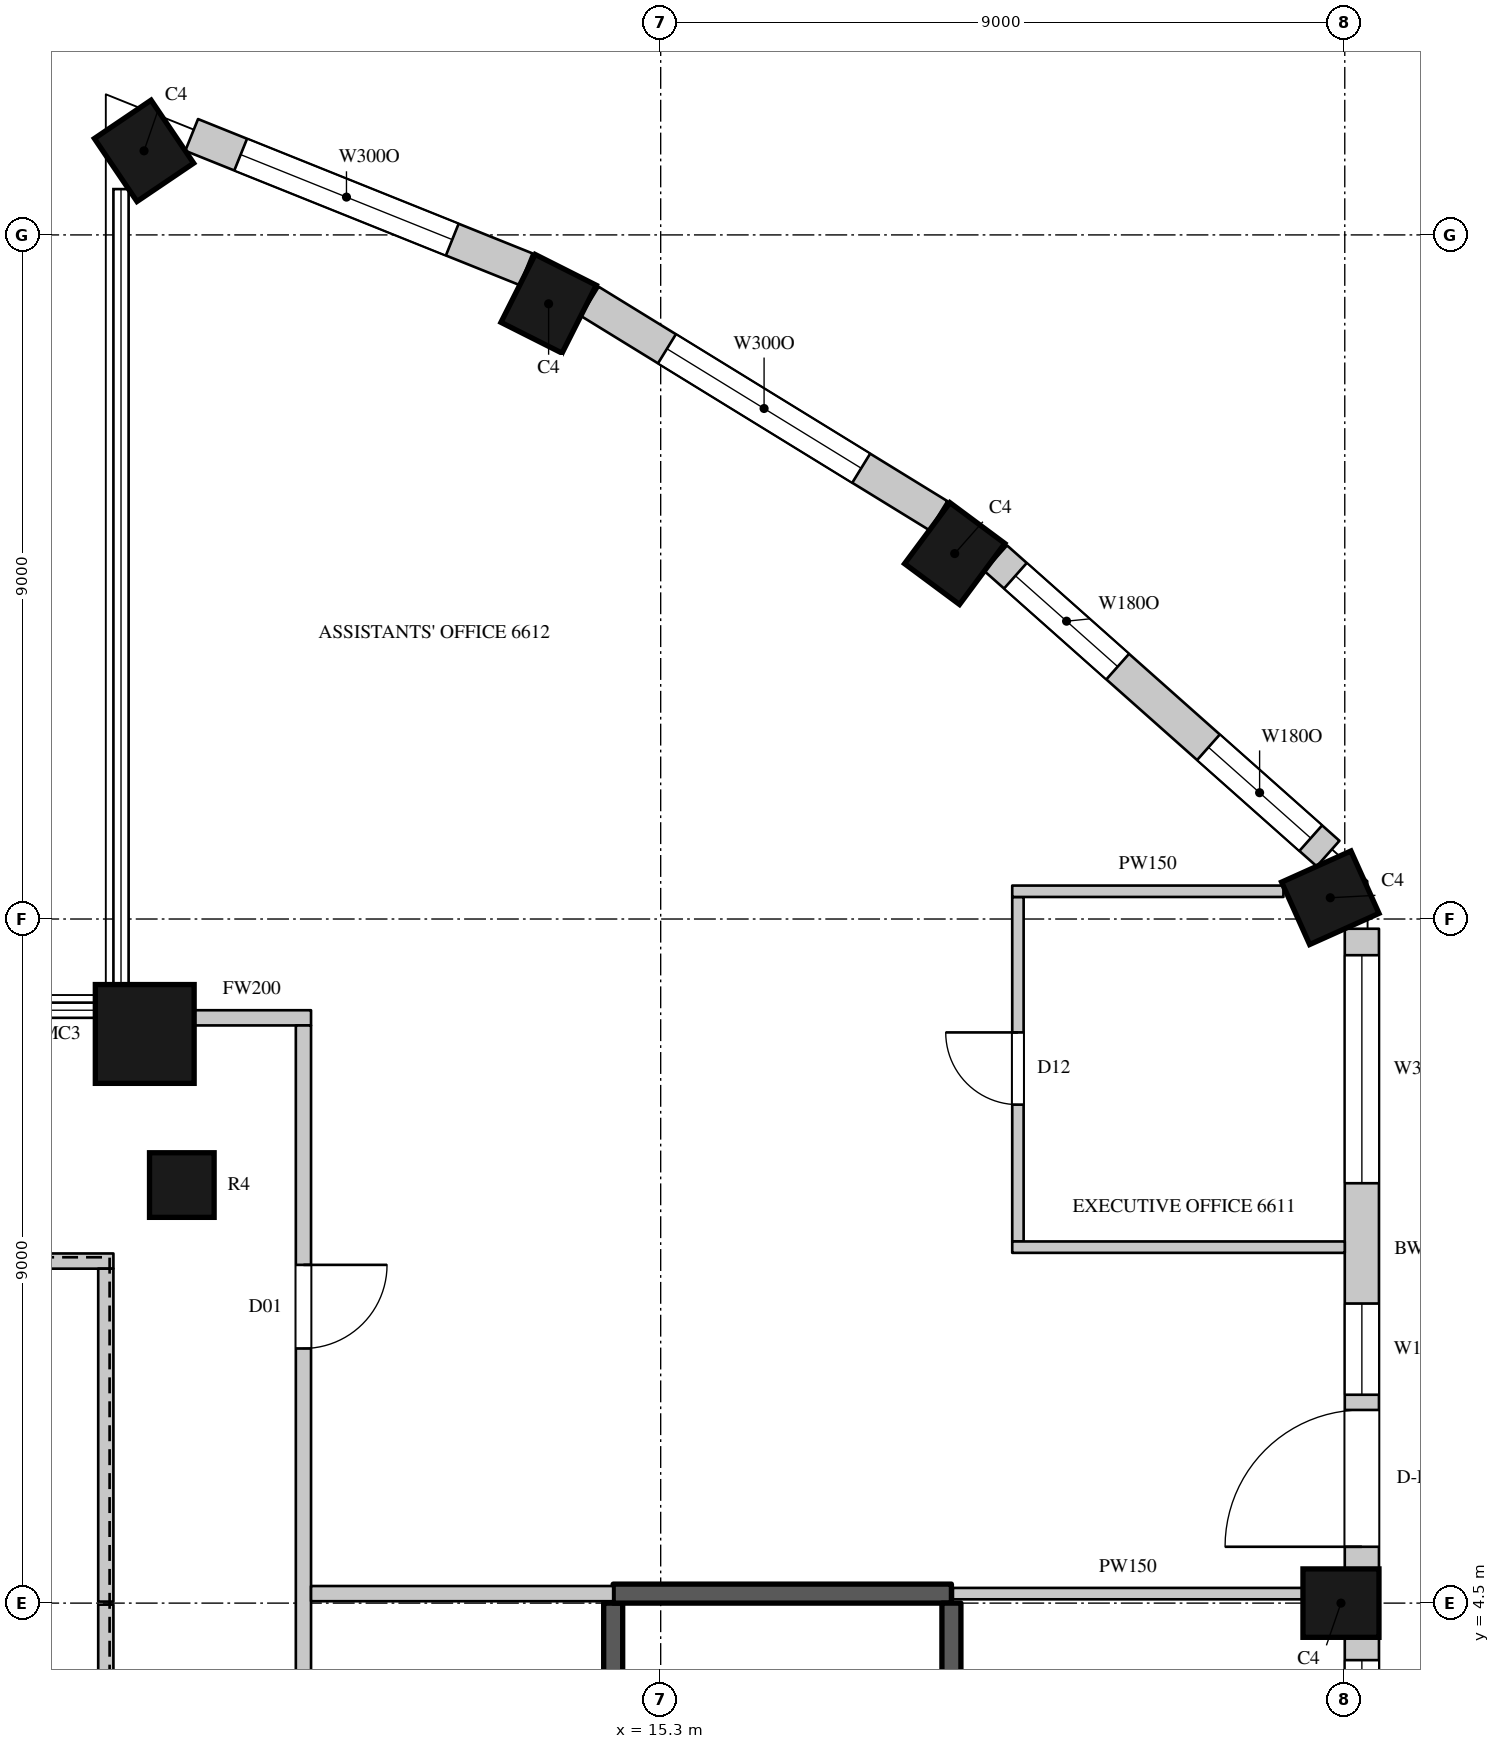
"""IFC4 building model, lengths in metres.
Left out: names, types, materials, properties, quantities, classifications, styles, units other than length and angle.
Written with IfcOpenShell. Run it as: python <this file> out.ifc"""

import sys

from ifc_helpers import new_model, si_unit, direction, frame, frame_2d, origin, origin_2d, place, context, subcontext, project, spatial, rectangle, circle, extrude, element, fill, save


model = new_model("IFC4")
c1 = context("Model", 3, precision=1e-05, world=origin(), true_north=direction((0.0, 1.0)))
c2 = subcontext(c1, "Body", "Model", "MODEL_VIEW")
j1 = project(units=[si_unit("LENGTHUNIT", "METRE"), si_unit("PLANEANGLEUNIT", "RADIAN")], contexts=[c1])
p1 = place(None, origin())
s1 = spatial("IfcSite", under=j1, at=p1, CompositionType="ELEMENT")
p2 = place(p1, origin())
s2 = spatial("IfcBuilding", under=s1, at=p2, CompositionType="ELEMENT")
p3 = place(p2, frame((0.0, 0.0, 292.6)))
s3 = spatial("IfcBuildingStorey", under=s2, at=p3, CompositionType="ELEMENT", Elevation=292.6)
p4 = place(p3, frame((8.503, 23.606, 0.0), z_axis=(0.0, 0.0, 1.0), x_axis=(-0.828469606019, -0.560034027451, 0.0)))
e1 = element("IfcColumn", 1, at=p4, inside=s3, PredefinedType="COLUMN", context=c2, shape_type="SweptSolid", body=[
    extrude(rectangle(XDim=0.9, YDim=1.0, at=origin_2d()), origin(), (0.0, 0.0, 1.0), 4.1),
])
p5 = place(p3, frame((8.512, 11.988, 0.0), z_axis=(0.0, 0.0, 1.0), x_axis=(1.0, 0.0, 0.0)))
e2 = element("IfcColumn", 2, at=p5, inside=s3, PredefinedType="COLUMN", context=c2, shape_type="SweptSolid", body=[
    extrude(circle(Radius=0.65, at=origin_2d()), origin(), (0.0, 0.0, 1.0), 4.1),
])
for number, where, z_axis, x_axis in (
    (3, (24.25, 4.5, 0.0), (0.0, 0.0, 1.0), (0.0, 1.0, 0.0)),
    (4, (24.11, 13.78, 0.0), (0.0, 0.0, 1.0), (-0.41, 0.912, 0.0)),
    (5, (19.168, 18.308, 0.0), (0.0, 0.0, 1.0), (-0.803, 0.596, 0.0)),
    (6, (13.826, 21.594, 0.0), (0.0, 0.0, 1.0), (-0.893, 0.45, 0.0)),
):
    element("IfcColumn", number, at=place(p3, frame(where, z_axis=z_axis, x_axis=x_axis)), inside=s3, PredefinedType="COLUMN", context=c2, shape_type="SweptSolid", body=[
        extrude(rectangle(XDim=0.9, YDim=1.0, at=origin_2d()), origin(), (0.0, 0.0, 1.0), 4.1),
    ])
p6 = place(p3, frame((9.0, 10.0, 0.0), z_axis=(0.0, 0.0, 1.0), x_axis=(1.0, 0.0, 0.0)))
e7 = element("IfcColumn", 7, at=p6, inside=s3, PredefinedType="COLUMN", context=c2, shape_type="SweptSolid", body=[
    extrude(circle(Radius=0.425, at=origin_2d()), origin(), (0.0, 0.0, 1.0), 4.1),
])
p7 = place(p3, frame((24.525, -4.05, 0.0), z_axis=(0.0, 0.0, 1.0), x_axis=(0.0, 1.0, 0.0)))
e8 = element("IfcWall", 8, at=p7, inside=s3, PredefinedType="SOLIDWALL", context=c2, shape_type="SweptSolid", body=[
    extrude(rectangle(XDim=8.1, YDim=0.45, at=frame_2d((4.05, 0.0))), origin(), (0.0, 0.0, 1.0), 3.8),
])
p8 = place(p7, frame((0.3, 0.0, 1.05)))
e9 = element("IfcOpeningElement", 9, at=p8, cuts=e8, PredefinedType="OPENING", context=c2, shape_type="SweptSolid", body=[
    extrude(rectangle(XDim=3.0, YDim=2.4, at=frame_2d((1.5, 1.2))), frame((0.0, 0.235, 0.0), z_axis=(0.0, -1.0, 0.0), x_axis=(1.0, 0.0, 0.0)), (0.0, 0.0, 1.0), 0.47),
])
p9 = place(p7, frame((4.8, 0.0, 1.05)))
e10 = element("IfcOpeningElement", 10, at=p9, cuts=e8, PredefinedType="OPENING", context=c2, shape_type="SweptSolid", body=[
    extrude(rectangle(XDim=3.0, YDim=2.4, at=frame_2d((1.5, 1.2))), frame((0.0, 0.235, 0.0), z_axis=(0.0, -1.0, 0.0), x_axis=(1.0, 0.0, 0.0)), (0.0, 0.0, 1.0), 0.47),
])
p10 = place(p3, frame((24.525, 4.95, 0.0), z_axis=(0.0, 0.0, 1.0), x_axis=(0.0, 1.0, 0.0)))
e11 = element("IfcWall", 11, at=p10, inside=s3, PredefinedType="SOLIDWALL", context=c2, shape_type="SweptSolid", body=[
    extrude(rectangle(XDim=8.422, YDim=0.45, at=frame_2d((4.211, 0.0))), origin(), (0.0, 0.0, 1.0), 3.8),
])
p11 = place(p10, frame((0.291, 0.0, 0.0)))
e12 = element("IfcOpeningElement", 12, at=p11, cuts=e11, PredefinedType="OPENING", context=c2, shape_type="SweptSolid", body=[
    extrude(rectangle(XDim=1.8, YDim=2.4, at=frame_2d((0.9, 1.2))), frame((0.0, 0.235, 0.0), z_axis=(0.0, -1.0, 0.0), x_axis=(1.0, 0.0, 0.0)), (0.0, 0.0, 1.0), 0.47),
])
p12 = place(p10, frame((2.291, 0.0, 1.05)))
e13 = element("IfcOpeningElement", 13, at=p12, cuts=e11, PredefinedType="OPENING", context=c2, shape_type="SweptSolid", body=[
    extrude(rectangle(XDim=1.2, YDim=2.4, at=frame_2d((0.6, 1.2))), frame((0.0, 0.235, 0.0), z_axis=(0.0, -1.0, 0.0), x_axis=(1.0, 0.0, 0.0)), (0.0, 0.0, 1.0), 0.47),
])
p13 = place(p10, frame((5.074, 0.0, 1.05)))
e14 = element("IfcOpeningElement", 14, at=p13, cuts=e11, PredefinedType="OPENING", context=c2, shape_type="SweptSolid", body=[
    extrude(rectangle(XDim=3.0, YDim=2.4, at=frame_2d((1.5, 1.2))), frame((0.0, 0.235, 0.0), z_axis=(0.0, -1.0, 0.0), x_axis=(1.0, 0.0, 0.0)), (0.0, 0.0, 1.0), 0.47),
])
p14 = place(p3, frame((24.081, 14.361, 0.0), z_axis=(0.0, 0.0, 1.0), x_axis=(-0.747570482973, 0.664182484704, 0.0)))
e15 = element("IfcWall", 15, at=p14, inside=s3, PredefinedType="SOLIDWALL", context=c2, shape_type="SweptSolid", body=[
    extrude(rectangle(XDim=5.85, YDim=0.45, at=frame_2d((2.925, 0.0))), origin(), (0.0, 0.0, 1.0), 3.8),
])
p15 = place(p14, frame((0.305, 0.0, 1.05)))
e16 = element("IfcOpeningElement", 16, at=p15, cuts=e15, PredefinedType="OPENING", context=c2, shape_type="SweptSolid", body=[
    extrude(rectangle(XDim=1.8, YDim=2.4, at=frame_2d((0.9, 1.2))), frame((0.0, 0.235, 0.0), z_axis=(0.0, -1.0, 0.0), x_axis=(1.0, 0.0, 0.0)), (0.0, 0.0, 1.0), 0.47),
])
p16 = place(p14, frame((3.703, 0.0, 1.05)))
e17 = element("IfcOpeningElement", 17, at=p16, cuts=e15, PredefinedType="OPENING", context=c2, shape_type="SweptSolid", body=[
    extrude(rectangle(XDim=1.8, YDim=2.4, at=frame_2d((0.9, 1.2))), frame((0.0, 0.235, 0.0), z_axis=(0.0, -1.0, 0.0), x_axis=(1.0, 0.0, 0.0)), (0.0, 0.0, 1.0), 0.47),
])
p17 = place(p3, frame((18.953, 18.806, 0.0), z_axis=(0.0, 0.0, 1.0), x_axis=(-0.851860664503, 0.523768468193, 0.0)))
e18 = element("IfcWall", 18, at=p17, inside=s3, PredefinedType="SOLIDWALL", context=c2, shape_type="SweptSolid", body=[
    extrude(rectangle(XDim=5.384, YDim=0.45, at=frame_2d((2.692, 0.0))), origin(), (0.0, 0.0, 1.0), 3.8),
])
p18 = place(p17, frame((1.192, 0.0, 1.05)))
e19 = element("IfcOpeningElement", 19, at=p18, cuts=e18, PredefinedType="OPENING", context=c2, shape_type="SweptSolid", body=[
    extrude(rectangle(XDim=3.0, YDim=2.4, at=frame_2d((1.5, 1.2))), frame((0.0, 0.235, 0.0), z_axis=(0.0, -1.0, 0.0), x_axis=(1.0, 0.0, 0.0)), (0.0, 0.0, 1.0), 0.47),
])
p19 = place(p3, frame((13.529, 22.048, 0.0), z_axis=(0.0, 0.0, 1.0), x_axis=(-0.927957332619, 0.372686448424, 0.0)))
e20 = element("IfcWall", 20, at=p19, inside=s3, PredefinedType="SOLIDWALL", context=c2, shape_type="SweptSolid", body=[
    extrude(rectangle(XDim=4.741, YDim=0.45, at=frame_2d((2.371, 0.0))), origin(), (0.0, 0.0, 1.0), 3.8),
])
p20 = place(p19, frame((1.047, 0.0, 1.05)))
e21 = element("IfcOpeningElement", 21, at=p20, cuts=e20, PredefinedType="OPENING", context=c2, shape_type="SweptSolid", body=[
    extrude(rectangle(XDim=3.0, YDim=2.4, at=frame_2d((1.5, 1.2))), frame((0.0, 0.235, 0.0), z_axis=(0.0, -1.0, 0.0), x_axis=(1.0, 0.0, 0.0)), (0.0, 0.0, 1.0), 0.47),
])
p21 = place(p3, frame((-6.1, 9.0, 0.0), z_axis=(0.0, 0.0, 1.0), x_axis=(1.0, 0.0, 0.0)))
e22 = element("IfcWall", 22, at=p21, inside=s3, PredefinedType="PARTITIONING", context=c2, shape_type="SweptSolid", body=[
    extrude(rectangle(XDim=14.2, YDim=0.2, at=frame_2d((7.1, 0.0))), origin(), (0.0, 0.0, 1.0), 3.8),
])
p22 = place(p3, frame((8.0, -8.9, 0.0), z_axis=(0.0, 0.0, 1.0), x_axis=(0.0, 1.0, 0.0)))
e23 = element("IfcWall", 23, at=p22, inside=s3, PredefinedType="PARTITIONING", context=c2, shape_type="SweptSolid", body=[
    extrude(rectangle(XDim=13.38, YDim=0.2, at=frame_2d((6.69, 0.0))), origin(), (0.0, 0.0, 1.0), 3.8),
])
p23 = place(p3, frame((8.0, 4.52, 0.0), z_axis=(0.0, 0.0, 1.0), x_axis=(0.0, 1.0, 0.0)))
e24 = element("IfcWall", 24, at=p23, inside=s3, PredefinedType="PARTITIONING", context=c2, shape_type="SweptSolid", body=[
    extrude(rectangle(XDim=4.38, YDim=0.2, at=frame_2d((2.19, 0.0))), origin(), (0.0, 0.0, 1.0), 3.8),
])
p24 = place(p3, frame((9.144, 12.2, 0.0), z_axis=(0.0, 0.0, 1.0), x_axis=(1.0, 0.0, 0.0)))
e25 = element("IfcWall", 25, at=p24, inside=s3, PredefinedType="PARTITIONING", context=c2, shape_type="SweptSolid", body=[
    extrude(rectangle(XDim=1.556, YDim=0.2, at=frame_2d((0.778, 0.0))), origin(), (0.0, 0.0, 1.0), 3.8),
])
p25 = place(p3, frame((10.6, -11.6, 0.0), z_axis=(0.0, 0.0, 1.0), x_axis=(0.0, 1.0, 0.0)))
e26 = element("IfcWall", 26, at=p25, inside=s3, PredefinedType="PARTITIONING", context=c2, shape_type="SweptSolid", body=[
    extrude(rectangle(XDim=23.7, YDim=0.2, at=frame_2d((11.85, 0.0))), origin(), (0.0, 0.0, 1.0), 3.8),
])
p26 = place(p25, frame((9.45, 0.0, 0.0)))
e27 = element("IfcOpeningElement", 27, at=p26, cuts=e26, PredefinedType="OPENING", context=c2, shape_type="SweptSolid", body=[
    extrude(rectangle(XDim=1.5, YDim=2.4, at=frame_2d((0.75, 1.2))), frame((0.0, 0.11, 0.0), z_axis=(0.0, -1.0, 0.0), x_axis=(1.0, 0.0, 0.0)), (0.0, 0.0, 1.0), 0.22),
])
p27 = place(p25, frame((19.45, 0.0, 0.0)))
e28 = element("IfcOpeningElement", 28, at=p27, cuts=e26, PredefinedType="OPENING", context=c2, shape_type="SweptSolid", body=[
    extrude(rectangle(XDim=1.1, YDim=2.4, at=frame_2d((0.55, 1.2))), frame((0.0, 0.11, 0.0), z_axis=(0.0, -1.0, 0.0), x_axis=(1.0, 0.0, 0.0)), (0.0, 0.0, 1.0), 0.22),
])
p28 = place(p25, frame((4.6, 0.0, 0.0)))
e29 = element("IfcOpeningElement", 29, at=p28, cuts=e26, PredefinedType="OPENING", context=c2, shape_type="SweptSolid", body=[
    extrude(rectangle(XDim=1.1, YDim=2.4, at=frame_2d((0.55, 1.2))), frame((0.0, 0.11, 0.0), z_axis=(0.0, -1.0, 0.0), x_axis=(1.0, 0.0, 0.0)), (0.0, 0.0, 1.0), 0.22),
])
p29 = place(p3, frame((10.7, 4.625, 0.0), z_axis=(0.0, 0.0, 1.0), x_axis=(1.0, 0.0, 0.0)))
e30 = element("IfcWall", 30, at=p29, inside=s3, PredefinedType="PARTITIONING", context=c2, shape_type="SweptSolid", body=[
    extrude(rectangle(XDim=3.975, YDim=0.2, at=frame_2d((1.988, 0.0))), origin(), (0.0, 0.0, 1.0), 3.8),
])
p30 = place(p3, frame((19.145, 4.625, 0.0), z_axis=(0.0, 0.0, 1.0), x_axis=(1.0, 0.0, 0.0)))
e31 = element("IfcWall", 31, at=p30, inside=s3, PredefinedType="PARTITIONING", context=c2, shape_type="SweptSolid", body=[
    extrude(rectangle(XDim=4.605, YDim=0.15, at=frame_2d((2.302, 0.0))), origin(), (0.0, 0.0, 1.0), 3.8),
])
p31 = place(p3, frame((20.0, 9.258, 0.0), z_axis=(0.0, 0.0, 1.0), x_axis=(0.0, 1.0, 0.0)))
e32 = element("IfcWall", 32, at=p31, inside=s3, PredefinedType="PARTITIONING", context=c2, shape_type="SweptSolid", body=[
    extrude(rectangle(XDim=4.532, YDim=0.15, at=frame_2d((2.266, 0.0))), origin(), (0.0, 0.0, 1.0), 3.8),
])
p32 = place(p31, frame((1.8, 0.0, 0.0)))
e33 = element("IfcOpeningElement", 33, at=p32, cuts=e32, PredefinedType="OPENING", context=c2, shape_type="SweptSolid", body=[
    extrude(rectangle(XDim=0.95, YDim=2.2, at=frame_2d((0.475, 1.1))), frame((0.0, 0.085, 0.0), z_axis=(0.0, -1.0, 0.0), x_axis=(1.0, 0.0, 0.0)), (0.0, 0.0, 1.0), 0.17),
])
p33 = place(p3, frame((19.925, 9.183, 0.0), z_axis=(0.0, 0.0, 1.0), x_axis=(1.0, 0.0, 0.0)))
e34 = element("IfcWall", 34, at=p33, inside=s3, PredefinedType="PARTITIONING", context=c2, shape_type="SweptSolid", body=[
    extrude(rectangle(XDim=4.375, YDim=0.15, at=frame_2d((2.188, 0.0))), origin(), (0.0, 0.0, 1.0), 3.15),
])
p34 = place(p3, frame((19.925, 13.865, 0.0), z_axis=(0.0, 0.0, 1.0), x_axis=(1.0, 0.0, 0.0)))
e35 = element("IfcWall", 35, at=p34, inside=s3, PredefinedType="PARTITIONING", context=c2, shape_type="SweptSolid", body=[
    extrude(rectangle(XDim=3.568, YDim=0.15, at=frame_2d((1.784, 0.0))), origin(), (0.0, 0.0, 1.0), 3.8),
])
p35 = place(p3, frame((14.675, -4.5, 0.0), z_axis=(0.0, 0.0, 1.0), x_axis=(0.0, 1.0, 0.0)))
e36 = element("IfcWall", 36, at=p35, inside=s3, PredefinedType="SHEAR", context=c2, shape_type="SweptSolid", body=[
    extrude(rectangle(XDim=9.0, YDim=0.25, at=frame_2d((4.5, 0.0))), origin(), (0.0, 0.0, 1.0), 3.8),
])
p36 = place(p35, frame((0.45, 0.0, 0.0)))
e37 = element("IfcOpeningElement", 37, at=p36, cuts=e36, PredefinedType="OPENING", context=c2, shape_type="SweptSolid", body=[
    extrude(rectangle(XDim=1.1, YDim=2.2, at=frame_2d((0.55, 1.1))), frame((0.0, 0.135, 0.0), z_axis=(0.0, -1.0, 0.0), x_axis=(1.0, 0.0, 0.0)), (0.0, 0.0, 1.0), 0.27),
])
p37 = place(p3, frame((14.675, 4.625, 0.0), z_axis=(0.0, 0.0, 1.0), x_axis=(1.0, 0.0, 0.0)))
e38 = element("IfcWall", 38, at=p37, inside=s3, PredefinedType="SHEAR", context=c2, shape_type="SweptSolid", body=[
    extrude(rectangle(XDim=4.45, YDim=0.25, at=frame_2d((2.225, 0.0))), origin(), (0.0, 0.0, 1.0), 3.8),
])
p38 = place(p3, frame((19.125, -4.5, 0.0), z_axis=(0.0, 0.0, 1.0), x_axis=(0.0, 1.0, 0.0)))
e39 = element("IfcWall", 39, at=p38, inside=s3, PredefinedType="SHEAR", context=c2, shape_type="SweptSolid", body=[
    extrude(rectangle(XDim=9.0, YDim=0.25, at=frame_2d((4.5, 0.0))), origin(), (0.0, 0.0, 1.0), 3.8),
])
p39 = place(p9, origin())
e40 = element("IfcWindow", 40, at=p39, inside=s3, PartitioningType="SINGLE_PANEL", PredefinedType="WINDOW", context=c2, shape_type="SweptSolid", body=[
    extrude(rectangle(XDim=3.0, YDim=2.4, at=frame_2d((1.5, 1.2))), frame((0.0, 0.135, 0.0), z_axis=(0.0, -1.0, 0.0), x_axis=(1.0, 0.0, 0.0)), (0.0, 0.0, 1.0), 0.06),
])
fill(e10, e40)
p40 = place(p11, origin())
e41 = element("IfcDoor", 41, at=p40, inside=s3, OperationType="SLIDING_TO_LEFT", PredefinedType="DOOR", context=c2, shape_type="SweptSolid", body=[
    extrude(rectangle(XDim=1.8, YDim=2.4, at=frame_2d((0.9, 1.2))), frame((0.0, 0.13, 0.0), z_axis=(0.0, -1.0, 0.0), x_axis=(1.0, 0.0, 0.0)), (0.0, 0.0, 1.0), 0.05),
])
fill(e12, e41)
p41 = place(p12, origin())
e42 = element("IfcWindow", 42, at=p41, inside=s3, PartitioningType="SINGLE_PANEL", PredefinedType="WINDOW", context=c2, shape_type="SweptSolid", body=[
    extrude(rectangle(XDim=1.2, YDim=2.4, at=frame_2d((0.6, 1.2))), frame((0.0, 0.135, 0.0), z_axis=(0.0, -1.0, 0.0), x_axis=(1.0, 0.0, 0.0)), (0.0, 0.0, 1.0), 0.06),
])
fill(e13, e42)
p42 = place(p13, origin())
e43 = element("IfcWindow", 43, at=p42, inside=s3, PartitioningType="SINGLE_PANEL", PredefinedType="WINDOW", context=c2, shape_type="SweptSolid", body=[
    extrude(rectangle(XDim=3.0, YDim=2.4, at=frame_2d((1.5, 1.2))), frame((0.0, 0.135, 0.0), z_axis=(0.0, -1.0, 0.0), x_axis=(1.0, 0.0, 0.0)), (0.0, 0.0, 1.0), 0.06),
])
fill(e14, e43)
p43 = place(p15, origin())
e44 = element("IfcWindow", 44, at=p43, inside=s3, PartitioningType="SINGLE_PANEL", PredefinedType="WINDOW", context=c2, shape_type="SweptSolid", body=[
    extrude(rectangle(XDim=1.8, YDim=2.4, at=frame_2d((0.9, 1.2))), frame((0.0, 0.135, 0.0), z_axis=(0.0, -1.0, 0.0), x_axis=(1.0, 0.0, 0.0)), (0.0, 0.0, 1.0), 0.06),
])
fill(e16, e44)
p44 = place(p16, origin())
e45 = element("IfcWindow", 45, at=p44, inside=s3, PartitioningType="SINGLE_PANEL", PredefinedType="WINDOW", context=c2, shape_type="SweptSolid", body=[
    extrude(rectangle(XDim=1.8, YDim=2.4, at=frame_2d((0.9, 1.2))), frame((0.0, 0.135, 0.0), z_axis=(0.0, -1.0, 0.0), x_axis=(1.0, 0.0, 0.0)), (0.0, 0.0, 1.0), 0.06),
])
fill(e17, e45)
p45 = place(p18, origin())
e46 = element("IfcWindow", 46, at=p45, inside=s3, PartitioningType="SINGLE_PANEL", PredefinedType="WINDOW", context=c2, shape_type="SweptSolid", body=[
    extrude(rectangle(XDim=3.0, YDim=2.4, at=frame_2d((1.5, 1.2))), frame((0.0, 0.135, 0.0), z_axis=(0.0, -1.0, 0.0), x_axis=(1.0, 0.0, 0.0)), (0.0, 0.0, 1.0), 0.06),
])
fill(e19, e46)
p46 = place(p20, origin())
e47 = element("IfcWindow", 47, at=p46, inside=s3, PartitioningType="SINGLE_PANEL", PredefinedType="WINDOW", context=c2, shape_type="SweptSolid", body=[
    extrude(rectangle(XDim=3.0, YDim=2.4, at=frame_2d((1.5, 1.2))), frame((0.0, 0.135, 0.0), z_axis=(0.0, -1.0, 0.0), x_axis=(1.0, 0.0, 0.0)), (0.0, 0.0, 1.0), 0.06),
])
fill(e21, e47)
p47 = place(p27, origin())
e48 = element("IfcDoor", 48, at=p47, inside=s3, OperationType="SINGLE_SWING_LEFT", PredefinedType="DOOR", context=c2, shape_type="SweptSolid", body=[
    extrude(rectangle(XDim=1.1, YDim=2.4, at=frame_2d((0.55, 1.2))), frame((0.0, 0.025, 0.0), z_axis=(0.0, -1.0, 0.0), x_axis=(1.0, 0.0, 0.0)), (0.0, 0.0, 1.0), 0.05),
])
fill(e28, e48)
p48 = place(p32, origin())
e49 = element("IfcDoor", 49, at=p48, inside=s3, OperationType="SINGLE_SWING_RIGHT", PredefinedType="DOOR", context=c2, shape_type="SweptSolid", body=[
    extrude(rectangle(XDim=0.95, YDim=2.2, at=frame_2d((0.475, 1.1))), frame((0.0, 0.025, 0.0), z_axis=(0.0, -1.0, 0.0), x_axis=(1.0, 0.0, 0.0)), (0.0, 0.0, 1.0), 0.05),
])
fill(e33, e49)
save(model, sys.argv[1])
